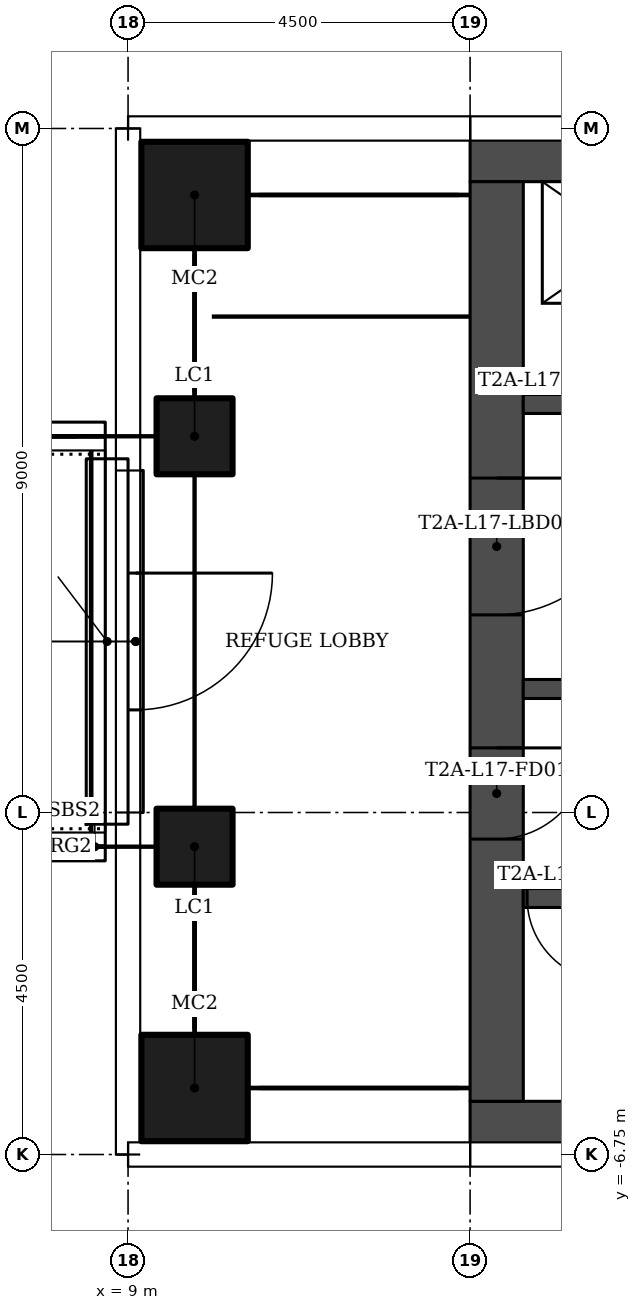
"""IFC4 building model, lengths in metres.
Left out: names, types, materials, properties, quantities, classifications, styles, units other than length and angle.
Written with IfcOpenShell. Run it as: python <this file> out.ifc"""

import sys

from ifc_helpers import new_model, si_unit, direction, frame, frame_2d, origin, origin_2d, place, context, subcontext, project, spatial, rectangle, hollow_rectangle, extrude, element, fill, save


model = new_model("IFC4")
c1 = context("Model", 3, precision=1e-05, world=origin(), true_north=direction((0.0, 1.0)))
c2 = subcontext(c1, "Body", "Model", "MODEL_VIEW")
j1 = project(units=[si_unit("LENGTHUNIT", "METRE"), si_unit("PLANEANGLEUNIT", "RADIAN")], contexts=[c1])
p1 = place(None, origin())
s1 = spatial("IfcSite", under=j1, at=p1, CompositionType="ELEMENT")
p2 = place(p1, origin())
s2 = spatial("IfcBuilding", under=s1, at=p2, CompositionType="ELEMENT")
p3 = place(p2, frame((0.0, 0.0, 77.1)))
s3 = spatial("IfcBuildingStorey", under=s2, at=p3, CompositionType="ELEMENT", Elevation=77.1)
for number, where in (
    (1, (9.875, -5.875, 0.0)),
    (2, (9.875, 5.875, 0.0)),
):
    element("IfcColumn", number, at=place(p3, frame(where)), inside=s3, PredefinedType="COLUMN", context=c2, shape_type="SweptSolid", body=[
        extrude(hollow_rectangle(XDim=1.4, YDim=1.4, WallThickness=0.05, at=origin_2d()), origin(), (0.0, 0.0, 1.0), 4.45),
    ])
for number, where in (
    (3, (9.875, -2.7, 0.0)),
    (4, (9.875, 2.7, 0.0)),
):
    element("IfcColumn", number, at=place(p3, frame(where)), inside=s3, PredefinedType="COLUMN", context=c2, shape_type="SweptSolid", body=[
        extrude(hollow_rectangle(XDim=1.0, YDim=1.0, WallThickness=0.04, at=origin_2d()), origin(), (0.0, 0.0, 1.0), 4.45),
    ])
p4 = place(p3, frame((9.1, 2.25, 0.0), z_axis=(0.0, 0.0, 1.0), x_axis=(0.0, -1.0, 0.0)))
e5 = element("IfcWall", 5, at=p4, inside=s3, PredefinedType="PARTITIONING", context=c2, shape_type="SweptSolid", body=[
    extrude(rectangle(XDim=4.5, YDim=0.2, at=frame_2d((2.25, 0.0))), origin(), (0.0, 0.0, 1.0), 4.45),
])
p5 = place(p4, frame((1.35, 0.0, 0.0)))
e6 = element("IfcOpeningElement", 6, at=p5, cuts=e5, PredefinedType="OPENING", context=c2, shape_type="SweptSolid", body=[
    extrude(rectangle(XDim=1.8, YDim=2.1, at=frame_2d((0.9, 1.05))), frame((0.0, 0.11, 0.0), z_axis=(0.0, -1.0, 0.0), x_axis=(1.0, 0.0, 0.0)), (0.0, 0.0, 1.0), 0.22),
])
for number, where in (
    (7, (13.5, -6.4, 0.0)),
    (8, (13.5, 6.4, 0.0)),
):
    element("IfcWall", number, at=place(p3, frame(where)), inside=s3, PredefinedType="SHEAR", context=c2, shape_type="SweptSolid", body=[
        extrude(rectangle(XDim=13.5, YDim=0.7, at=frame_2d((6.75, 0.0))), origin(), (0.0, 0.0, 1.0), 4.45),
    ])
p6 = place(p3, frame((13.85, 6.05, 0.0), z_axis=(0.0, 0.0, 1.0), x_axis=(0.0, -1.0, 0.0)))
e9 = element("IfcWall", 9, at=p6, inside=s3, PredefinedType="SHEAR", context=c2, shape_type="SweptSolid", body=[
    extrude(rectangle(XDim=12.1, YDim=0.7, at=frame_2d((6.05, 0.0))), origin(), (0.0, 0.0, 1.0), 4.45),
])
p7 = place(p6, frame((7.45, 0.0, 0.0)))
e10 = element("IfcOpeningElement", 10, at=p7, cuts=e9, PredefinedType="OPENING", context=c2, shape_type="SweptSolid", body=[
    extrude(rectangle(XDim=1.2, YDim=2.1, at=frame_2d((0.6, 1.05))), frame((0.0, 0.36, 0.0), z_axis=(0.0, -1.0, 0.0), x_axis=(1.0, 0.0, 0.0)), (0.0, 0.0, 1.0), 0.72),
])
p8 = place(p6, frame((3.9, 0.0, 0.0)))
e11 = element("IfcOpeningElement", 11, at=p8, cuts=e9, PredefinedType="OPENING", context=c2, shape_type="SweptSolid", body=[
    extrude(rectangle(XDim=1.8, YDim=2.4, at=frame_2d((0.9, 1.2))), frame((0.0, 0.36, 0.0), z_axis=(0.0, -1.0, 0.0), x_axis=(1.0, 0.0, 0.0)), (0.0, 0.0, 1.0), 0.72),
])
p9 = place(p3, frame((26.3, -3.375, 0.0), z_axis=(0.0, 0.0, 1.0), x_axis=(-1.0, 0.0, 0.0)))
e12 = element("IfcWall", 12, at=p9, inside=s3, PredefinedType="SHEAR", context=c2, shape_type="SweptSolid", body=[
    extrude(rectangle(XDim=12.1, YDim=0.25, at=frame_2d((6.05, 0.0))), origin(), (0.0, 0.0, 1.0), 4.45),
])
p10 = place(p9, frame((10.95, 0.0, 0.0)))
e13 = element("IfcOpeningElement", 13, at=p10, cuts=e12, PredefinedType="OPENING", context=c2, shape_type="SweptSolid", body=[
    extrude(rectangle(XDim=1.1, YDim=2.1, at=frame_2d((0.55, 1.05))), frame((0.0, 0.135, 0.0), z_axis=(0.0, -1.0, 0.0), x_axis=(1.0, 0.0, 0.0)), (0.0, 0.0, 1.0), 0.27),
])
p11 = place(p3, frame((26.3, -0.625, 0.0), z_axis=(0.0, 0.0, 1.0), x_axis=(-1.0, 0.0, 0.0)))
e14 = element("IfcWall", 14, at=p11, inside=s3, PredefinedType="SHEAR", context=c2, shape_type="SweptSolid", body=[
    extrude(rectangle(XDim=12.1, YDim=0.25, at=frame_2d((6.05, 0.0))), origin(), (0.0, 0.0, 1.0), 4.45),
])
p12 = place(p11, frame((8.65, 0.0, 0.0)))
e15 = element("IfcOpeningElement", 15, at=p12, cuts=e14, PredefinedType="OPENING", context=c2, shape_type="SweptSolid", body=[
    extrude(rectangle(XDim=1.2, YDim=2.1, at=frame_2d((0.6, 1.05))), frame((0.0, 0.135, 0.0), z_axis=(0.0, -1.0, 0.0), x_axis=(1.0, 0.0, 0.0)), (0.0, 0.0, 1.0), 0.27),
])
p13 = place(p11, frame((1.175, 0.0, 0.0)))
e16 = element("IfcOpeningElement", 16, at=p13, cuts=e14, PredefinedType="OPENING", context=c2, shape_type="SweptSolid", body=[
    extrude(rectangle(XDim=0.9, YDim=2.1, at=frame_2d((0.45, 1.05))), frame((0.0, 0.135, 0.0), z_axis=(0.0, -1.0, 0.0), x_axis=(1.0, 0.0, 0.0)), (0.0, 0.0, 1.0), 0.27),
])
p14 = place(p3, frame((14.2, 3.125, 0.0)))
e17 = element("IfcWall", 17, at=p14, inside=s3, PredefinedType="SHEAR", context=c2, shape_type="SweptSolid", body=[
    extrude(rectangle(XDim=12.1, YDim=0.25, at=frame_2d((6.05, 0.0))), origin(), (0.0, 0.0, 1.0), 4.45),
])
p15 = place(p14, frame((0.85, 0.0, 0.0)))
e18 = element("IfcOpeningElement", 18, at=p15, cuts=e17, PredefinedType="OPENING", context=c2, shape_type="SweptSolid", body=[
    extrude(rectangle(XDim=1.1, YDim=2.1, at=frame_2d((0.55, 1.05))), frame((0.0, 0.135, 0.0), z_axis=(0.0, -1.0, 0.0), x_axis=(1.0, 0.0, 0.0)), (0.0, 0.0, 1.0), 0.27),
])
p16 = place(p14, frame((3.9, 0.0, 0.0)))
e19 = element("IfcOpeningElement", 19, at=p16, cuts=e17, PredefinedType="OPENING", context=c2, shape_type="SweptSolid", body=[
    extrude(rectangle(XDim=1.1, YDim=2.1, at=frame_2d((0.55, 1.05))), frame((0.0, 0.135, 0.0), z_axis=(0.0, -1.0, 0.0), x_axis=(1.0, 0.0, 0.0)), (0.0, 0.0, 1.0), 0.27),
])
p17 = place(p5, origin())
e20 = element("IfcDoor", 20, at=p17, inside=s3, OperationType="DOUBLE_DOOR_SINGLE_SWING", PredefinedType="DOOR", context=c2, shape_type="SweptSolid", body=[
    extrude(rectangle(XDim=1.8, YDim=2.1, at=frame_2d((0.9, 1.05))), frame((0.0, 0.025, 0.0), z_axis=(0.0, -1.0, 0.0), x_axis=(1.0, 0.0, 0.0)), (0.0, 0.0, 1.0), 0.05),
])
fill(e6, e20)
p18 = place(p7, origin())
e21 = element("IfcDoor", 21, at=p18, inside=s3, OperationType="SINGLE_SWING_RIGHT", PredefinedType="DOOR", context=c2, shape_type="SweptSolid", body=[
    extrude(rectangle(XDim=1.2, YDim=2.1, at=frame_2d((0.6, 1.05))), frame((0.0, 0.025, 0.0), z_axis=(0.0, -1.0, 0.0), x_axis=(1.0, 0.0, 0.0)), (0.0, 0.0, 1.0), 0.05),
])
fill(e10, e21)
p19 = place(p8, origin())
e22 = element("IfcDoor", 22, at=p19, inside=s3, OperationType="DOUBLE_DOOR_SINGLE_SWING", PredefinedType="DOOR", context=c2, shape_type="SweptSolid", body=[
    extrude(rectangle(XDim=1.8, YDim=2.4, at=frame_2d((0.9, 1.2))), frame((0.0, 0.025, 0.0), z_axis=(0.0, -1.0, 0.0), x_axis=(1.0, 0.0, 0.0)), (0.0, 0.0, 1.0), 0.05),
])
fill(e11, e22)
p20 = place(p10, origin())
e23 = element("IfcDoor", 23, at=p20, inside=s3, OperationType="SINGLE_SWING_RIGHT", PredefinedType="DOOR", context=c2, shape_type="SweptSolid", body=[
    extrude(rectangle(XDim=1.1, YDim=2.1, at=frame_2d((0.55, 1.05))), frame((0.0, 0.025, 0.0), z_axis=(0.0, -1.0, 0.0), x_axis=(1.0, 0.0, 0.0)), (0.0, 0.0, 1.0), 0.05),
])
fill(e13, e23)
save(model, sys.argv[1])
